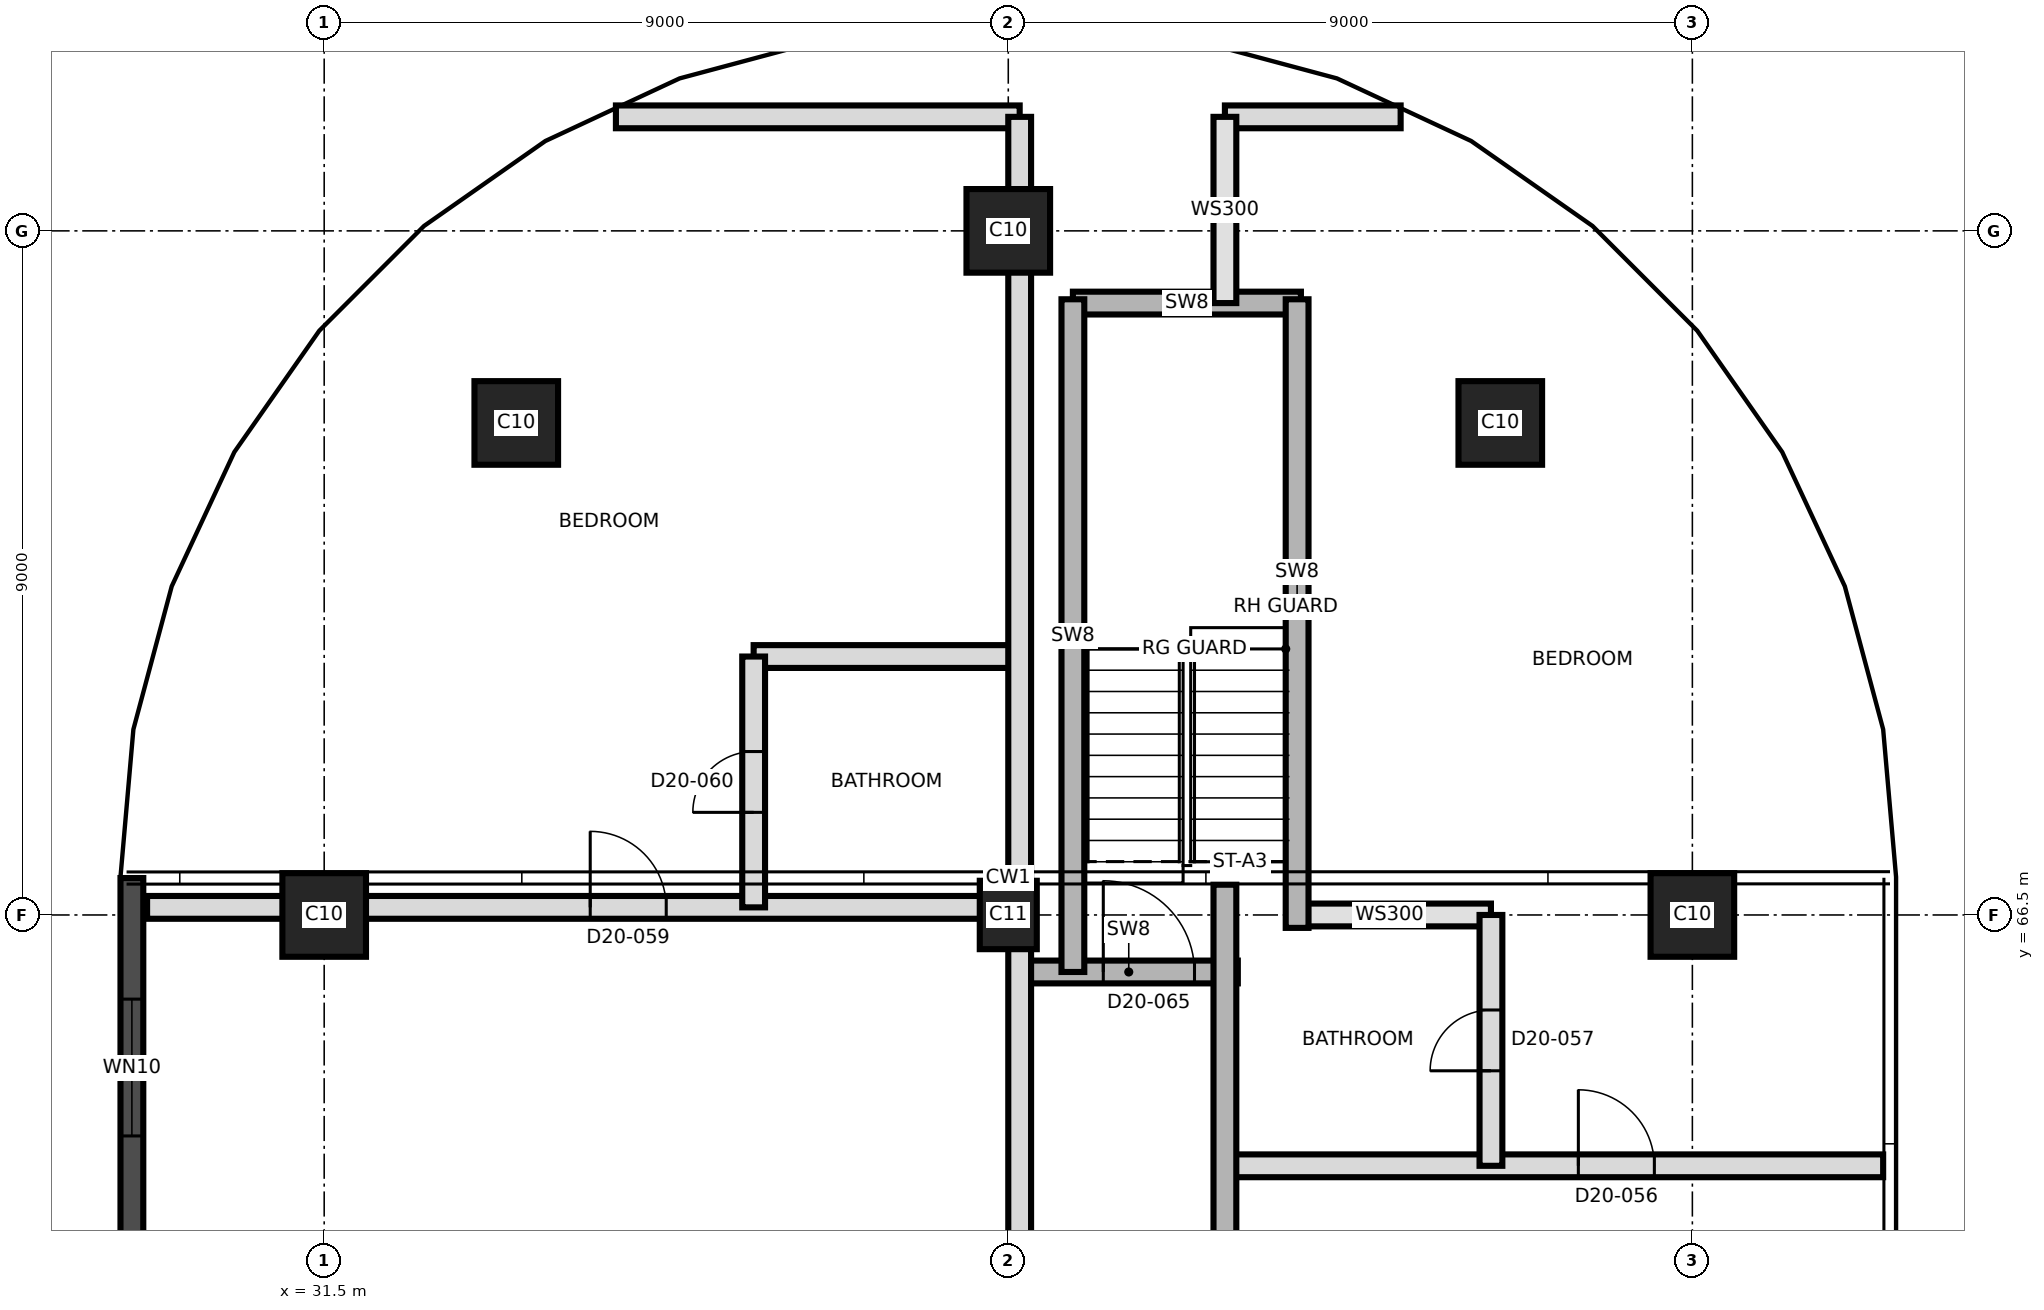
"""IFC4 building model, lengths in metres.
Left out: names, types, materials, properties, quantities, classifications, styles, units other than length and angle.
Written with IfcOpenShell. Run it as: python <this file> out.ifc"""

import sys

from ifc_helpers import new_model, si_unit, direction, frame, frame_2d, origin, origin_2d, place, context, subcontext, project, spatial, rectangle, extrude, element, fill, save


model = new_model("IFC4")
c1 = context("Model", 3, precision=1e-05, world=origin(), true_north=direction((0.0, 1.0)))
c2 = subcontext(c1, "Body", "Model", "MODEL_VIEW")
j1 = project(units=[si_unit("LENGTHUNIT", "METRE"), si_unit("PLANEANGLEUNIT", "RADIAN")], contexts=[c1])
p1 = place(None, origin())
s1 = spatial("IfcSite", under=j1, at=p1, CompositionType="ELEMENT")
p2 = place(p1, origin())
s2 = spatial("IfcBuilding", under=s1, at=p2, CompositionType="ELEMENT")
p3 = place(p2, frame((0.0, 0.0, 186.6)))
s3 = spatial("IfcBuildingStorey", under=s2, at=p3, CompositionType="ELEMENT", Elevation=186.6)
p4 = place(p3, frame((31.5, 66.5, 0.0), z_axis=(0.0, 0.0, 1.0), x_axis=(1.0, 0.0, 0.0)))
e1 = element("IfcColumn", 1, at=p4, inside=s3, PredefinedType="COLUMN", context=c2, shape_type="SweptSolid", body=[
    extrude(rectangle(XDim=1.1, YDim=1.1, at=origin_2d()), origin(), (0.0, 0.0, 1.0), 3.7),
])
p5 = place(p3, frame((40.5, 66.5, 0.0), z_axis=(0.0, 0.0, 1.0), x_axis=(0.0, 1.0, 0.0)))
e2 = element("IfcColumn", 2, at=p5, inside=s3, PredefinedType="COLUMN", context=c2, shape_type="SweptSolid", body=[
    extrude(rectangle(XDim=0.9, YDim=0.75, at=origin_2d()), origin(), (0.0, 0.0, 1.0), 3.7),
])
for number, where, z_axis, x_axis in (
    (3, (49.5, 66.5, 0.0), (0.0, 0.0, 1.0), (1.0, 0.0, 0.0)),
    (4, (34.027, 72.973, 0.0), (0.0, 0.0, 1.0), (1.0, 0.0, 0.0)),
    (5, (46.973, 72.973, 0.0), (0.0, 0.0, 1.0), (1.0, 0.0, 0.0)),
    (6, (40.5, 75.5, 0.0), (0.0, 0.0, 1.0), (1.0, 0.0, 0.0)),
):
    element("IfcColumn", number, at=place(p3, frame(where, z_axis=z_axis, x_axis=x_axis)), inside=s3, PredefinedType="COLUMN", context=c2, shape_type="SweptSolid", body=[
        extrude(rectangle(XDim=1.1, YDim=1.1, at=origin_2d()), origin(), (0.0, 0.0, 1.0), 3.7),
    ])
p6 = place(p3, frame((28.97, 66.986, 0.0), z_axis=(0.0, 0.0, 1.0), x_axis=(0.0, -1.0, 0.0)))
e7 = element("IfcWall", 7, at=p6, inside=s3, PredefinedType="SOLIDWALL", context=c2, shape_type="SweptSolid", body=[
    extrude(rectangle(XDim=32.976, YDim=0.3, at=frame_2d((16.488, 0.0))), origin(), (0.0, 0.0, 1.0), 3.4),
])
p7 = place(p6, frame((1.593, 0.0, 0.3)))
e8 = element("IfcOpeningElement", 8, at=p7, cuts=e7, PredefinedType="OPENING", context=c2, shape_type="SweptSolid", body=[
    extrude(rectangle(XDim=1.8, YDim=2.4, at=frame_2d((0.9, 1.2))), frame((0.0, 0.16, 0.0), z_axis=(0.0, -1.0, 0.0), x_axis=(1.0, 0.0, 0.0)), (0.0, 0.0, 1.0), 0.32),
])
p8 = place(p6, frame((5.136, 0.0, 0.9)))
e9 = element("IfcOpeningElement", 9, at=p8, cuts=e7, PredefinedType="OPENING", context=c2, shape_type="SweptSolid", body=[
    extrude(rectangle(XDim=4.2, YDim=1.5, at=frame_2d((2.1, 0.75))), frame((0.0, 0.16, 0.0), z_axis=(0.0, -1.0, 0.0), x_axis=(1.0, 0.0, 0.0)), (0.0, 0.0, 1.0), 0.32),
])
p9 = place(p6, frame((9.636, 0.0, 0.9)))
e10 = element("IfcOpeningElement", 10, at=p9, cuts=e7, PredefinedType="OPENING", context=c2, shape_type="SweptSolid", body=[
    extrude(rectangle(XDim=4.2, YDim=1.5, at=frame_2d((2.1, 0.75))), frame((0.0, 0.16, 0.0), z_axis=(0.0, -1.0, 0.0), x_axis=(1.0, 0.0, 0.0)), (0.0, 0.0, 1.0), 0.32),
])
p10 = place(p6, frame((14.136, 0.0, 0.9)))
e11 = element("IfcOpeningElement", 11, at=p10, cuts=e7, PredefinedType="OPENING", context=c2, shape_type="SweptSolid", body=[
    extrude(rectangle(XDim=4.2, YDim=1.5, at=frame_2d((2.1, 0.75))), frame((0.0, 0.16, 0.0), z_axis=(0.0, -1.0, 0.0), x_axis=(1.0, 0.0, 0.0)), (0.0, 0.0, 1.0), 0.32),
])
p11 = place(p6, frame((18.636, 0.0, 0.9)))
e12 = element("IfcOpeningElement", 12, at=p11, cuts=e7, PredefinedType="OPENING", context=c2, shape_type="SweptSolid", body=[
    extrude(rectangle(XDim=4.2, YDim=1.5, at=frame_2d((2.1, 0.75))), frame((0.0, 0.16, 0.0), z_axis=(0.0, -1.0, 0.0), x_axis=(1.0, 0.0, 0.0)), (0.0, 0.0, 1.0), 0.32),
])
p12 = place(p6, frame((23.136, 0.0, 0.9)))
e13 = element("IfcOpeningElement", 13, at=p12, cuts=e7, PredefinedType="OPENING", context=c2, shape_type="SweptSolid", body=[
    extrude(rectangle(XDim=4.2, YDim=1.5, at=frame_2d((2.1, 0.75))), frame((0.0, 0.16, 0.0), z_axis=(0.0, -1.0, 0.0), x_axis=(1.0, 0.0, 0.0)), (0.0, 0.0, 1.0), 0.32),
])
p13 = place(p6, frame((29.331, 0.0, 0.3)))
e14 = element("IfcOpeningElement", 14, at=p13, cuts=e7, PredefinedType="OPENING", context=c2, shape_type="SweptSolid", body=[
    extrude(rectangle(XDim=1.8, YDim=2.4, at=frame_2d((0.9, 1.2))), frame((0.0, 0.16, 0.0), z_axis=(0.0, -1.0, 0.0), x_axis=(1.0, 0.0, 0.0)), (0.0, 0.0, 1.0), 0.32),
])
p14 = place(p3, frame((43.35, 63.2, 0.0), z_axis=(0.0, 0.0, 1.0), x_axis=(1.0, 0.0, 0.0)))
e15 = element("IfcWall", 15, at=p14, inside=s3, PredefinedType="PARTITIONING", context=c2, shape_type="SweptSolid", body=[
    extrude(rectangle(XDim=8.66, YDim=0.3, at=frame_2d((4.33, 0.0))), origin(), (0.0, 0.0, 1.0), 3.35),
])
p15 = place(p14, frame((4.65, 0.0, 0.0)))
e16 = element("IfcOpeningElement", 16, at=p15, cuts=e15, PredefinedType="OPENING", context=c2, shape_type="SweptSolid", body=[
    extrude(rectangle(XDim=1.0, YDim=2.1, at=frame_2d((0.5, 1.05))), frame((0.0, 0.16, 0.0), z_axis=(0.0, -1.0, 0.0), x_axis=(1.0, 0.0, 0.0)), (0.0, 0.0, 1.0), 0.32),
])
p16 = place(p3, frame((40.65, 65.75, 0.0), z_axis=(0.0, 0.0, 1.0), x_axis=(1.0, 0.0, 0.0)))
e17 = element("IfcWall", 17, at=p16, inside=s3, PredefinedType="SHEAR", context=c2, shape_type="SweptSolid", body=[
    extrude(rectangle(XDim=2.87, YDim=0.3, at=frame_2d((1.435, 0.0))), origin(), (0.0, 0.0, 1.0), 3.35),
])
p17 = place(p16, frame((1.1, 0.0, 0.0)))
e18 = element("IfcOpeningElement", 18, at=p17, cuts=e17, PredefinedType="OPENING", context=c2, shape_type="SweptSolid", body=[
    extrude(rectangle(XDim=1.2, YDim=2.1, at=frame_2d((0.6, 1.05))), frame((0.0, 0.16, 0.0), z_axis=(0.0, -1.0, 0.0), x_axis=(1.0, 0.0, 0.0)), (0.0, 0.0, 1.0), 0.32),
])
p18 = place(p3, frame((44.18, 66.5, 0.0), z_axis=(0.0, 0.0, 1.0), x_axis=(1.0, 0.0, 0.0)))
e19 = element("IfcWall", 19, at=p18, inside=s3, PredefinedType="SOLIDWALL", context=c2, shape_type="SweptSolid", body=[
    extrude(rectangle(XDim=2.67, YDim=0.3, at=frame_2d((1.335, 0.0))), origin(), (0.0, 0.0, 1.0), 3.35),
])
p19 = place(p3, frame((29.17, 66.6, 0.0), z_axis=(0.0, 0.0, 1.0), x_axis=(1.0, 0.0, 0.0)))
e20 = element("IfcWall", 20, at=p19, inside=s3, PredefinedType="PARTITIONING", context=c2, shape_type="SweptSolid", body=[
    extrude(rectangle(XDim=11.48, YDim=0.3, at=frame_2d((5.74, 0.0))), origin(), (0.0, 0.0, 1.0), 3.35),
])
p20 = place(p19, frame((5.83, 0.0, 0.0)))
e21 = element("IfcOpeningElement", 21, at=p20, cuts=e20, PredefinedType="OPENING", context=c2, shape_type="SweptSolid", body=[
    extrude(rectangle(XDim=1.0, YDim=2.1, at=frame_2d((0.5, 1.05))), frame((0.0, 0.16, 0.0), z_axis=(0.0, -1.0, 0.0), x_axis=(1.0, 0.0, 0.0)), (0.0, 0.0, 1.0), 0.32),
])
p21 = place(p3, frame((37.15, 69.9, 0.0), z_axis=(0.0, 0.0, 1.0), x_axis=(1.0, 0.0, 0.0)))
e22 = element("IfcWall", 22, at=p21, inside=s3, PredefinedType="PARTITIONING", context=c2, shape_type="SweptSolid", body=[
    extrude(rectangle(XDim=3.5, YDim=0.3, at=frame_2d((1.75, 0.0))), origin(), (0.0, 0.0, 1.0), 3.35),
])
p22 = place(p3, frame((41.35, 74.55, 0.0), z_axis=(0.0, 0.0, 1.0), x_axis=(1.0, 0.0, 0.0)))
e23 = element("IfcWall", 23, at=p22, inside=s3, PredefinedType="SHEAR", context=c2, shape_type="SweptSolid", body=[
    extrude(rectangle(XDim=3.0, YDim=0.3, at=frame_2d((1.5, 0.0))), origin(), (0.0, 0.0, 1.0), 3.35),
])
p23 = place(p3, frame((35.338, 77.0, 0.0), z_axis=(0.0, 0.0, 1.0), x_axis=(1.0, 0.0, 0.0)))
e24 = element("IfcWall", 24, at=p23, inside=s3, PredefinedType="PARTITIONING", context=c2, shape_type="SweptSolid", body=[
    extrude(rectangle(XDim=5.312, YDim=0.3, at=frame_2d((2.656, 0.0))), origin(), (0.0, 0.0, 1.0), 3.35),
])
p24 = place(p3, frame((43.35, 77.0, 0.0), z_axis=(0.0, 0.0, 1.0), x_axis=(1.0, 0.0, 0.0)))
e25 = element("IfcWall", 25, at=p24, inside=s3, PredefinedType="PARTITIONING", context=c2, shape_type="SweptSolid", body=[
    extrude(rectangle(XDim=2.312, YDim=0.3, at=frame_2d((1.156, 0.0))), origin(), (0.0, 0.0, 1.0), 3.35),
])
p25 = place(p3, frame((37.15, 66.6, 0.0), z_axis=(0.0, 0.0, 1.0), x_axis=(0.0, 1.0, 0.0)))
e26 = element("IfcWall", 26, at=p25, inside=s3, PredefinedType="PARTITIONING", context=c2, shape_type="SweptSolid", body=[
    extrude(rectangle(XDim=3.3, YDim=0.3, at=frame_2d((1.65, 0.0))), origin(), (0.0, 0.0, 1.0), 3.35),
])
p26 = place(p25, frame((1.25, 0.0, 0.0)))
e27 = element("IfcOpeningElement", 27, at=p26, cuts=e26, PredefinedType="OPENING", context=c2, shape_type="SweptSolid", body=[
    extrude(rectangle(XDim=0.8, YDim=2.1, at=frame_2d((0.4, 1.05))), frame((0.0, 0.16, 0.0), z_axis=(0.0, -1.0, 0.0), x_axis=(1.0, 0.0, 0.0)), (0.0, 0.0, 1.0), 0.32),
])
p27 = place(p3, frame((40.65, 39.65, 0.0), z_axis=(0.0, 0.0, 1.0), x_axis=(0.0, 1.0, 0.0)))
e28 = element("IfcWall", 28, at=p27, inside=s3, PredefinedType="PARTITIONING", context=c2, shape_type="SweptSolid", body=[
    extrude(rectangle(XDim=37.35, YDim=0.3, at=frame_2d((18.675, 0.0))), origin(), (0.0, 0.0, 1.0), 3.35),
])
p28 = place(p27, frame((1.0, 0.0, 0.0)))
e29 = element("IfcOpeningElement", 29, at=p28, cuts=e28, PredefinedType="OPENING", context=c2, shape_type="SweptSolid", body=[
    extrude(rectangle(XDim=1.0, YDim=2.1, at=frame_2d((0.5, 1.05))), frame((0.0, 0.16, 0.0), z_axis=(0.0, -1.0, 0.0), x_axis=(1.0, 0.0, 0.0)), (0.0, 0.0, 1.0), 0.32),
])
p29 = place(p27, frame((6.85, 0.0, 0.0)))
e30 = element("IfcOpeningElement", 30, at=p29, cuts=e28, PredefinedType="OPENING", context=c2, shape_type="SweptSolid", body=[
    extrude(rectangle(XDim=1.0, YDim=2.1, at=frame_2d((0.5, 1.05))), frame((0.0, 0.16, 0.0), z_axis=(0.0, -1.0, 0.0), x_axis=(1.0, 0.0, 0.0)), (0.0, 0.0, 1.0), 0.32),
])
p30 = place(p27, frame((10.0, 0.0, 0.0)))
e31 = element("IfcOpeningElement", 31, at=p30, cuts=e28, PredefinedType="OPENING", context=c2, shape_type="SweptSolid", body=[
    extrude(rectangle(XDim=1.0, YDim=2.1, at=frame_2d((0.5, 1.05))), frame((0.0, 0.16, 0.0), z_axis=(0.0, -1.0, 0.0), x_axis=(1.0, 0.0, 0.0)), (0.0, 0.0, 1.0), 0.32),
])
p31 = place(p27, frame((15.85, 0.0, 0.0)))
e32 = element("IfcOpeningElement", 32, at=p31, cuts=e28, PredefinedType="OPENING", context=c2, shape_type="SweptSolid", body=[
    extrude(rectangle(XDim=1.0, YDim=2.1, at=frame_2d((0.5, 1.05))), frame((0.0, 0.16, 0.0), z_axis=(0.0, -1.0, 0.0), x_axis=(1.0, 0.0, 0.0)), (0.0, 0.0, 1.0), 0.32),
])
p32 = place(p27, frame((21.35, 0.0, 0.0)))
e33 = element("IfcOpeningElement", 33, at=p32, cuts=e28, PredefinedType="OPENING", context=c2, shape_type="SweptSolid", body=[
    extrude(rectangle(XDim=1.0, YDim=2.1, at=frame_2d((0.5, 1.05))), frame((0.0, 0.16, 0.0), z_axis=(0.0, -1.0, 0.0), x_axis=(1.0, 0.0, 0.0)), (0.0, 0.0, 1.0), 0.32),
])
p33 = place(p3, frame((41.35, 65.75, 0.0), z_axis=(0.0, 0.0, 1.0), x_axis=(0.0, 1.0, 0.0)))
e34 = element("IfcWall", 34, at=p33, inside=s3, PredefinedType="SHEAR", context=c2, shape_type="SweptSolid", body=[
    extrude(rectangle(XDim=8.85, YDim=0.3, at=frame_2d((4.425, 0.0))), origin(), (0.0, 0.0, 1.0), 3.35),
])
p34 = place(p3, frame((43.35, 39.65, 0.0), z_axis=(0.0, 0.0, 1.0), x_axis=(0.0, 1.0, 0.0)))
e35 = element("IfcWall", 35, at=p34, inside=s3, PredefinedType="SHEAR", context=c2, shape_type="SweptSolid", body=[
    extrude(rectangle(XDim=27.248, YDim=0.3, at=frame_2d((13.624, 0.0))), origin(), (0.0, 0.0, 1.0), 3.4),
])
p35 = place(p34, frame((1.0, 0.0, 0.0)))
e36 = element("IfcOpeningElement", 36, at=p35, cuts=e35, PredefinedType="OPENING", context=c2, shape_type="SweptSolid", body=[
    extrude(rectangle(XDim=1.0, YDim=2.1, at=frame_2d((0.5, 1.05))), frame((0.0, 0.16, 0.0), z_axis=(0.0, -1.0, 0.0), x_axis=(1.0, 0.0, 0.0)), (0.0, 0.0, 1.0), 0.32),
])
p36 = place(p34, frame((6.85, 0.0, 0.0)))
e37 = element("IfcOpeningElement", 37, at=p36, cuts=e35, PredefinedType="OPENING", context=c2, shape_type="SweptSolid", body=[
    extrude(rectangle(XDim=1.0, YDim=2.1, at=frame_2d((0.5, 1.05))), frame((0.0, 0.16, 0.0), z_axis=(0.0, -1.0, 0.0), x_axis=(1.0, 0.0, 0.0)), (0.0, 0.0, 1.0), 0.32),
])
p37 = place(p34, frame((12.85, 0.0, 0.0)))
e38 = element("IfcOpeningElement", 38, at=p37, cuts=e35, PredefinedType="OPENING", context=c2, shape_type="SweptSolid", body=[
    extrude(rectangle(XDim=1.0, YDim=2.1, at=frame_2d((0.5, 1.05))), frame((0.0, 0.16, 0.0), z_axis=(0.0, -1.0, 0.0), x_axis=(1.0, 0.0, 0.0)), (0.0, 0.0, 1.0), 0.32),
])
p38 = place(p34, frame((19.85, 0.0, 0.0)))
e39 = element("IfcOpeningElement", 39, at=p38, cuts=e35, PredefinedType="OPENING", context=c2, shape_type="SweptSolid", body=[
    extrude(rectangle(XDim=1.0, YDim=2.1, at=frame_2d((0.5, 1.05))), frame((0.0, 0.16, 0.0), z_axis=(0.0, -1.0, 0.0), x_axis=(1.0, 0.0, 0.0)), (0.0, 0.0, 1.0), 0.32),
])
p39 = place(p3, frame((43.35, 74.55, 0.0), z_axis=(0.0, 0.0, 1.0), x_axis=(0.0, 1.0, 0.0)))
e40 = element("IfcWall", 40, at=p39, inside=s3, PredefinedType="SOLIDWALL", context=c2, shape_type="SweptSolid", body=[
    extrude(rectangle(XDim=2.45, YDim=0.3, at=frame_2d((1.225, 0.0))), origin(), (0.0, 0.0, 1.0), 3.35),
])
p40 = place(p3, frame((44.3, 66.33, 0.0), z_axis=(0.0, 0.0, 1.0), x_axis=(0.0, 1.0, 0.0)))
e41 = element("IfcWall", 41, at=p40, inside=s3, PredefinedType="SHEAR", context=c2, shape_type="SweptSolid", body=[
    extrude(rectangle(XDim=8.27, YDim=0.3, at=frame_2d((4.135, 0.0))), origin(), (0.0, 0.0, 1.0), 3.35),
])
p41 = place(p3, frame((46.85, 63.2, 0.0), z_axis=(0.0, 0.0, 1.0), x_axis=(0.0, 1.0, 0.0)))
e42 = element("IfcWall", 42, at=p41, inside=s3, PredefinedType="PARTITIONING", context=c2, shape_type="SweptSolid", body=[
    extrude(rectangle(XDim=3.3, YDim=0.3, at=frame_2d((1.65, 0.0))), origin(), (0.0, 0.0, 1.0), 3.35),
])
p42 = place(p41, frame((1.25, 0.0, 0.0)))
e43 = element("IfcOpeningElement", 43, at=p42, cuts=e42, PredefinedType="OPENING", context=c2, shape_type="SweptSolid", body=[
    extrude(rectangle(XDim=0.8, YDim=2.1, at=frame_2d((0.4, 1.05))), frame((0.0, 0.16, 0.0), z_axis=(0.0, -1.0, 0.0), x_axis=(1.0, 0.0, 0.0)), (0.0, 0.0, 1.0), 0.32),
])
p43 = place(p7, origin())
e44 = element("IfcWindow", 44, at=p43, inside=s3, PartitioningType="SINGLE_PANEL", PredefinedType="WINDOW", context=c2, shape_type="SweptSolid", body=[
    extrude(rectangle(XDim=1.8, YDim=2.4, at=frame_2d((0.9, 1.2))), frame((0.0, 0.03, 0.0), z_axis=(0.0, -1.0, 0.0), x_axis=(1.0, 0.0, 0.0)), (0.0, 0.0, 1.0), 0.06),
])
fill(e8, e44)
p44 = place(p15, origin())
e45 = element("IfcDoor", 45, at=p44, inside=s3, OperationType="SINGLE_SWING_RIGHT", PredefinedType="DOOR", context=c2, shape_type="SweptSolid", body=[
    extrude(rectangle(XDim=1.0, YDim=2.1, at=frame_2d((0.5, 1.05))), frame((0.0, 0.025, 0.0), z_axis=(0.0, -1.0, 0.0), x_axis=(1.0, 0.0, 0.0)), (0.0, 0.0, 1.0), 0.05),
])
fill(e16, e45)
p45 = place(p42, origin())
e46 = element("IfcDoor", 46, at=p45, inside=s3, OperationType="SINGLE_SWING_LEFT", PredefinedType="DOOR", context=c2, shape_type="SweptSolid", body=[
    extrude(rectangle(XDim=0.8, YDim=2.1, at=frame_2d((0.4, 1.05))), frame((0.0, 0.025, 0.0), z_axis=(0.0, -1.0, 0.0), x_axis=(1.0, 0.0, 0.0)), (0.0, 0.0, 1.0), 0.05),
])
fill(e43, e46)
p46 = place(p20, origin())
e47 = element("IfcDoor", 47, at=p46, inside=s3, OperationType="SINGLE_SWING_RIGHT", PredefinedType="DOOR", context=c2, shape_type="SweptSolid", body=[
    extrude(rectangle(XDim=1.0, YDim=2.1, at=frame_2d((0.5, 1.05))), frame((0.0, 0.025, 0.0), z_axis=(0.0, -1.0, 0.0), x_axis=(1.0, 0.0, 0.0)), (0.0, 0.0, 1.0), 0.05),
])
fill(e21, e47)
p47 = place(p26, origin())
e48 = element("IfcDoor", 48, at=p47, inside=s3, OperationType="SINGLE_SWING_LEFT", PredefinedType="DOOR", context=c2, shape_type="SweptSolid", body=[
    extrude(rectangle(XDim=0.8, YDim=2.1, at=frame_2d((0.4, 1.05))), frame((0.0, 0.025, 0.0), z_axis=(0.0, -1.0, 0.0), x_axis=(1.0, 0.0, 0.0)), (0.0, 0.0, 1.0), 0.05),
])
fill(e27, e48)
p48 = place(p17, origin())
e49 = element("IfcDoor", 49, at=p48, inside=s3, OperationType="SINGLE_SWING_RIGHT", PredefinedType="DOOR", context=c2, shape_type="SweptSolid", body=[
    extrude(rectangle(XDim=1.2, YDim=2.1, at=frame_2d((0.6, 1.05))), frame((0.0, 0.025, 0.0), z_axis=(0.0, -1.0, 0.0), x_axis=(1.0, 0.0, 0.0)), (0.0, 0.0, 1.0), 0.05),
])
fill(e18, e49)
save(model, sys.argv[1])
